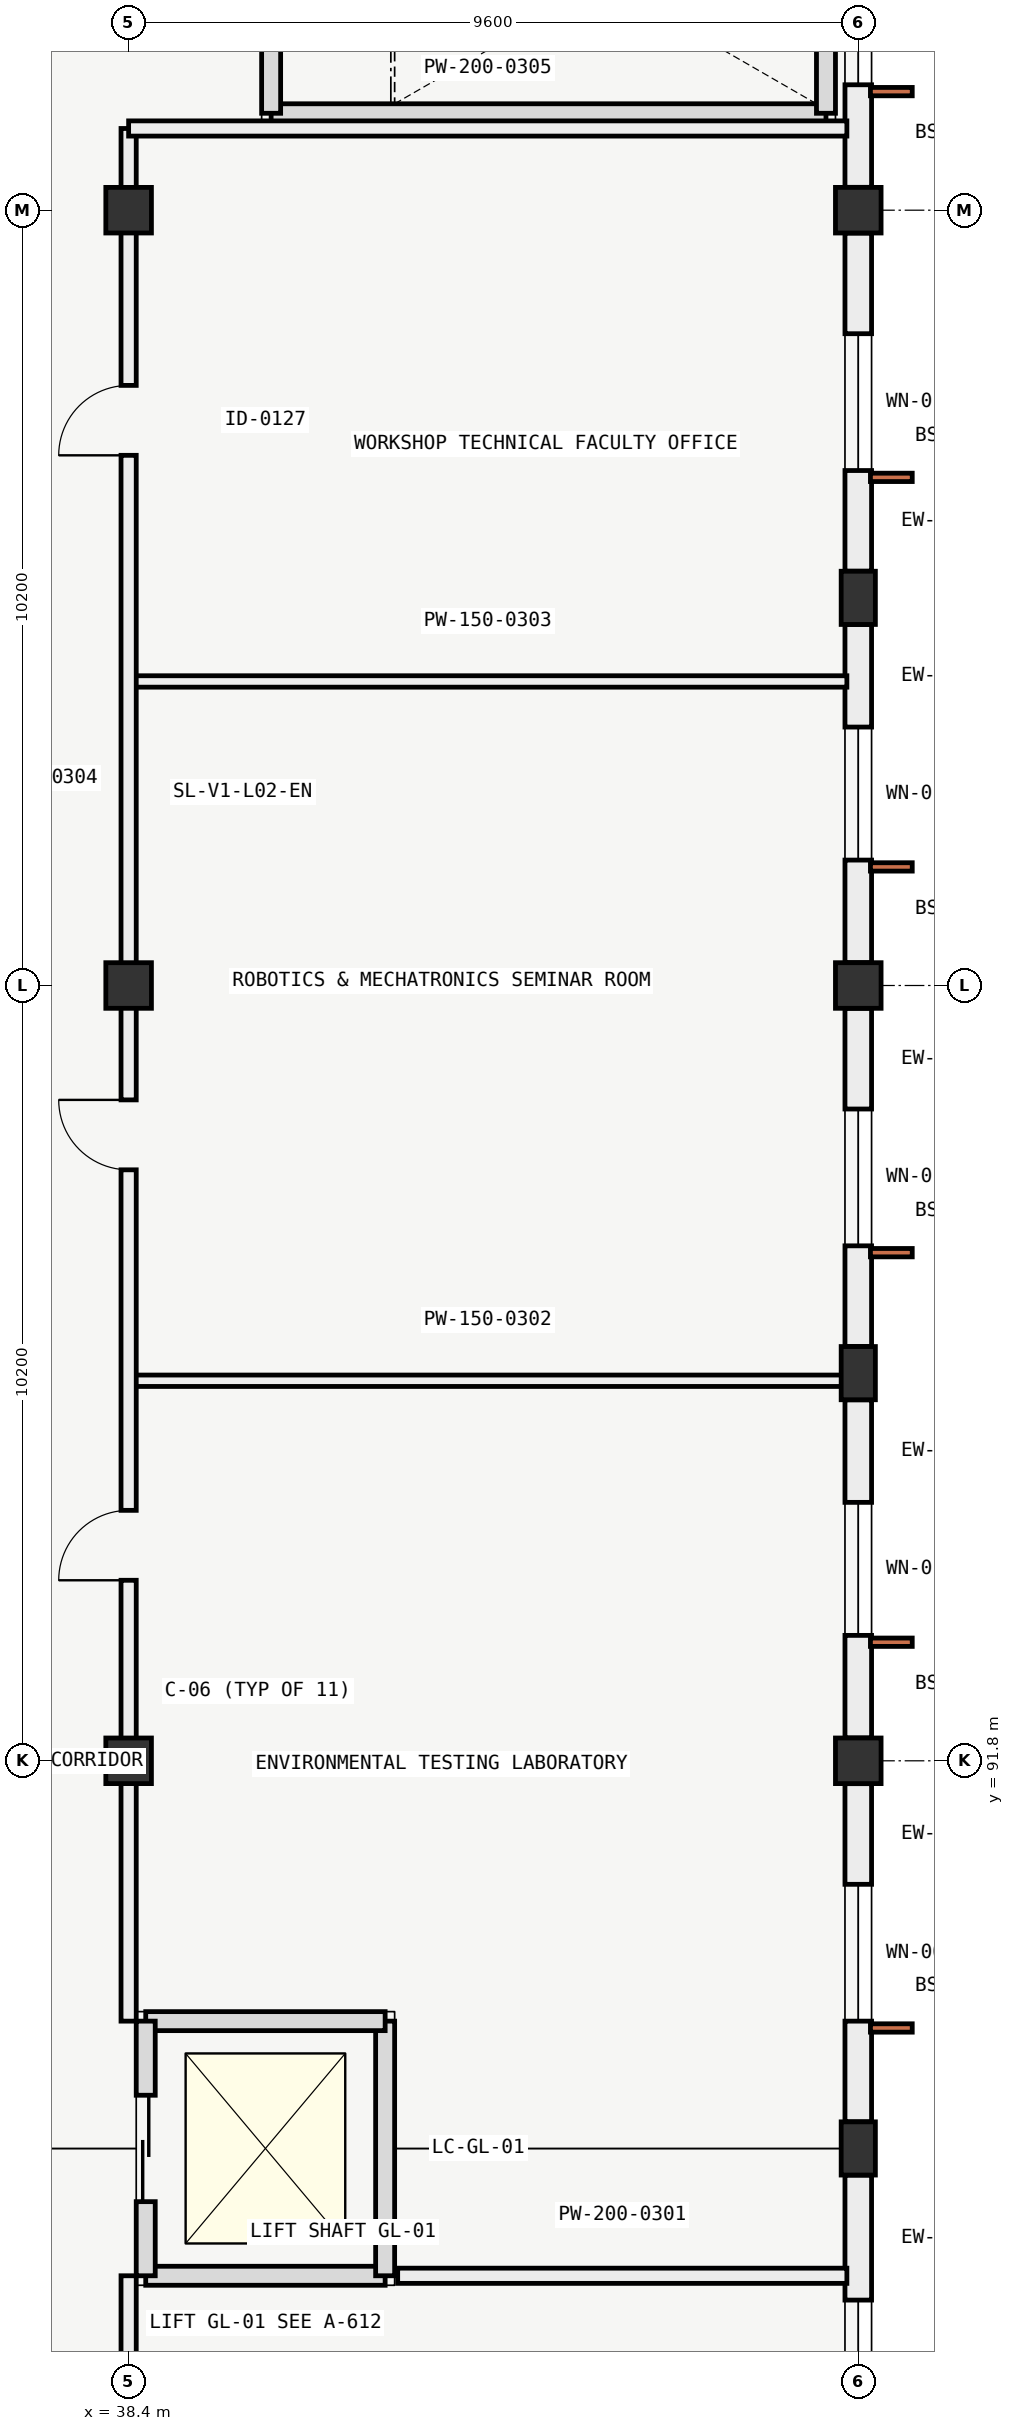
"""IFC4 building model, lengths in metres.
Left out: names, types, materials, properties, quantities, classifications, styles, units other than length and angle.
Written with IfcOpenShell. Run it as: python <this file> out.ifc"""

import sys

from ifc_helpers import new_model, si_unit, direction, frame, frame_2d, origin, origin_2d, place, context, subcontext, project, spatial, rectangle, extrude, element, fill, save


model = new_model("IFC4")
c1 = context("Model", 3, precision=1e-05, world=origin(), true_north=direction((0.0, 1.0)))
c2 = subcontext(c1, "Body", "Model", "MODEL_VIEW")
j1 = project(units=[si_unit("LENGTHUNIT", "METRE"), si_unit("PLANEANGLEUNIT", "RADIAN")], contexts=[c1])
p1 = place(None, origin())
s1 = spatial("IfcSite", under=j1, at=p1, CompositionType="ELEMENT")
p2 = place(p1, origin())
s2 = spatial("IfcBuilding", under=s1, at=p2, CompositionType="ELEMENT")
p3 = place(p2, frame((0.0, 0.0, 9.6)))
s3 = spatial("IfcBuildingStorey", under=s2, at=p3, CompositionType="ELEMENT", Elevation=9.6)
for number, where, z_axis, x_axis in (
    (1, (38.4, 91.8, 0.0), (0.0, 0.0, 1.0), (1.0, 0.0, 0.0)),
    (2, (48.0, 91.8, 0.0), (0.0, 0.0, 1.0), (1.0, 0.0, 0.0)),
    (3, (38.4, 102.0, 0.0), (0.0, 0.0, 1.0), (1.0, 0.0, 0.0)),
    (4, (48.0, 102.0, 0.0), (0.0, 0.0, 1.0), (1.0, 0.0, 0.0)),
    (5, (38.4, 112.2, 0.0), (0.0, 0.0, 1.0), (1.0, 0.0, 0.0)),
    (6, (48.0, 112.2, 0.0), (0.0, 0.0, 1.0), (1.0, 0.0, 0.0)),
):
    element("IfcColumn", number, at=place(p3, frame(where, z_axis=z_axis, x_axis=x_axis)), inside=s3, PredefinedType="COLUMN", context=c2, shape_type="SweptSolid", body=[
        extrude(rectangle(XDim=0.6, YDim=0.6, at=origin_2d()), origin(), (0.0, 0.0, 1.0), 4.2),
    ])
for number, where, z_axis, x_axis in (
    (7, (48.0, 86.7, 0.0), (0.0, 0.0, 1.0), (1.0, 0.0, 0.0)),
    (8, (48.0, 96.9, 0.0), (0.0, 0.0, 1.0), (1.0, 0.0, 0.0)),
    (9, (48.0, 107.1, 0.0), (0.0, 0.0, 1.0), (1.0, 0.0, 0.0)),
):
    element("IfcColumn", number, at=place(p3, frame(where, z_axis=z_axis, x_axis=x_axis)), inside=s3, PredefinedType="PILASTER", context=c2, shape_type="SweptSolid", body=[
        extrude(rectangle(XDim=0.45, YDim=0.7, at=origin_2d()), origin(), (0.0, 0.0, 1.0), 4.2),
    ])
p4 = place(p3, frame((48.0, 86.349, 0.0), z_axis=(0.0, 0.0, 1.0), x_axis=(0.0, -1.0, 0.0)))
e10 = element("IfcWall", 10, at=p4, inside=s3, PredefinedType="SOLIDWALL", context=c2, shape_type="SweptSolid", body=[
    extrude(rectangle(XDim=4.448, YDim=0.35, at=frame_2d((2.224, 0.0))), origin(), (0.0, 0.0, 1.0), 3.32),
])
p5 = place(p4, frame((1.644, 0.0, 0.95)))
e11 = element("IfcOpeningElement", 11, at=p5, cuts=e10, PredefinedType="OPENING", context=c2, shape_type="SweptSolid", body=[
    extrude(rectangle(XDim=1.75, YDim=2.05, at=frame_2d((0.875, 1.025))), frame((0.0, 0.185, 0.0), z_axis=(0.0, -1.0, 0.0), x_axis=(1.0, 0.0, 0.0)), (0.0, 0.0, 1.0), 0.37),
])
p6 = place(p3, frame((48.0, 91.499, 0.0), z_axis=(0.0, 0.0, 1.0), x_axis=(0.0, -1.0, 0.0)))
e12 = element("IfcWall", 12, at=p6, inside=s3, PredefinedType="SOLIDWALL", context=c2, shape_type="SweptSolid", body=[
    extrude(rectangle(XDim=4.448, YDim=0.35, at=frame_2d((2.224, 0.0))), origin(), (0.0, 0.0, 1.0), 3.32),
])
p7 = place(p6, frame((1.324, 0.0, 0.95)))
e13 = element("IfcOpeningElement", 13, at=p7, cuts=e12, PredefinedType="OPENING", context=c2, shape_type="SweptSolid", body=[
    extrude(rectangle(XDim=1.8, YDim=2.1, at=frame_2d((0.9, 1.05))), frame((0.0, 0.185, 0.0), z_axis=(0.0, -1.0, 0.0), x_axis=(1.0, 0.0, 0.0)), (0.0, 0.0, 1.0), 0.37),
])
p8 = place(p3, frame((48.0, 96.549, 0.0), z_axis=(0.0, 0.0, 1.0), x_axis=(0.0, -1.0, 0.0)))
e14 = element("IfcWall", 14, at=p8, inside=s3, PredefinedType="SOLIDWALL", context=c2, shape_type="SweptSolid", body=[
    extrude(rectangle(XDim=4.448, YDim=0.35, at=frame_2d((2.224, 0.0))), origin(), (0.0, 0.0, 1.0), 3.32),
])
p9 = place(p8, frame((1.349, 0.0, 0.95)))
e15 = element("IfcOpeningElement", 15, at=p9, cuts=e14, PredefinedType="OPENING", context=c2, shape_type="SweptSolid", body=[
    extrude(rectangle(XDim=1.75, YDim=2.05, at=frame_2d((0.875, 1.025))), frame((0.0, 0.185, 0.0), z_axis=(0.0, -1.0, 0.0), x_axis=(1.0, 0.0, 0.0)), (0.0, 0.0, 1.0), 0.37),
])
p10 = place(p3, frame((48.0, 101.699, 0.0), z_axis=(0.0, 0.0, 1.0), x_axis=(0.0, -1.0, 0.0)))
e16 = element("IfcWall", 16, at=p10, inside=s3, PredefinedType="SOLIDWALL", context=c2, shape_type="SweptSolid", body=[
    extrude(rectangle(XDim=4.448, YDim=0.35, at=frame_2d((2.224, 0.0))), origin(), (0.0, 0.0, 1.0), 3.32),
])
p11 = place(p10, frame((1.324, 0.0, 0.95)))
e17 = element("IfcOpeningElement", 17, at=p11, cuts=e16, PredefinedType="OPENING", context=c2, shape_type="SweptSolid", body=[
    extrude(rectangle(XDim=1.8, YDim=2.1, at=frame_2d((0.9, 1.05))), frame((0.0, 0.185, 0.0), z_axis=(0.0, -1.0, 0.0), x_axis=(1.0, 0.0, 0.0)), (0.0, 0.0, 1.0), 0.37),
])
p12 = place(p3, frame((48.0, 106.749, 0.0), z_axis=(0.0, 0.0, 1.0), x_axis=(0.0, -1.0, 0.0)))
e18 = element("IfcWall", 18, at=p12, inside=s3, PredefinedType="SOLIDWALL", context=c2, shape_type="SweptSolid", body=[
    extrude(rectangle(XDim=4.448, YDim=0.35, at=frame_2d((2.224, 0.0))), origin(), (0.0, 0.0, 1.0), 3.32),
])
p13 = place(p12, frame((1.349, 0.0, 0.95)))
e19 = element("IfcOpeningElement", 19, at=p13, cuts=e18, PredefinedType="OPENING", context=c2, shape_type="SweptSolid", body=[
    extrude(rectangle(XDim=1.75, YDim=2.05, at=frame_2d((0.875, 1.025))), frame((0.0, 0.185, 0.0), z_axis=(0.0, -1.0, 0.0), x_axis=(1.0, 0.0, 0.0)), (0.0, 0.0, 1.0), 0.37),
])
p14 = place(p3, frame((48.0, 111.899, 0.0), z_axis=(0.0, 0.0, 1.0), x_axis=(0.0, -1.0, 0.0)))
e20 = element("IfcWall", 20, at=p14, inside=s3, PredefinedType="SOLIDWALL", context=c2, shape_type="SweptSolid", body=[
    extrude(rectangle(XDim=4.448, YDim=0.35, at=frame_2d((2.224, 0.0))), origin(), (0.0, 0.0, 1.0), 3.32),
])
p15 = place(p14, frame((1.324, 0.0, 0.95)))
e21 = element("IfcOpeningElement", 21, at=p15, cuts=e20, PredefinedType="OPENING", context=c2, shape_type="SweptSolid", body=[
    extrude(rectangle(XDim=1.8, YDim=2.1, at=frame_2d((0.9, 1.05))), frame((0.0, 0.185, 0.0), z_axis=(0.0, -1.0, 0.0), x_axis=(1.0, 0.0, 0.0)), (0.0, 0.0, 1.0), 0.37),
])
p16 = place(p3, frame((48.0, 116.949, 0.0), z_axis=(0.0, 0.0, 1.0), x_axis=(0.0, -1.0, 0.0)))
e22 = element("IfcWall", 22, at=p16, inside=s3, PredefinedType="SOLIDWALL", context=c2, shape_type="SweptSolid", body=[
    extrude(rectangle(XDim=4.448, YDim=0.35, at=frame_2d((2.224, 0.0))), origin(), (0.0, 0.0, 1.0), 3.32),
])
p17 = place(p16, frame((1.349, 0.0, 0.95)))
e23 = element("IfcOpeningElement", 23, at=p17, cuts=e22, PredefinedType="OPENING", context=c2, shape_type="SweptSolid", body=[
    extrude(rectangle(XDim=1.75, YDim=2.05, at=frame_2d((0.875, 1.025))), frame((0.0, 0.185, 0.0), z_axis=(0.0, -1.0, 0.0), x_axis=(1.0, 0.0, 0.0)), (0.0, 0.0, 1.0), 0.37),
])
p18 = place(p3, frame((40.275, 113.475, 0.0), z_axis=(0.0, 0.0, 1.0), x_axis=(1.0, 0.0, 0.0)))
e24 = element("IfcWall", 24, at=p18, inside=s3, PredefinedType="SOLIDWALL", context=c2, shape_type="SweptSolid", body=[
    extrude(rectangle(XDim=7.3, YDim=0.25, at=frame_2d((3.65, 0.0))), origin(), (0.0, 0.0, 1.0), 3.15),
])
p19 = place(p3, frame((47.575, 113.475, 0.0), z_axis=(0.0, 0.0, 1.0), x_axis=(0.0, 1.0, 0.0)))
e25 = element("IfcWall", 25, at=p19, inside=s3, PredefinedType="SOLIDWALL", context=c2, shape_type="SweptSolid", body=[
    extrude(rectangle(XDim=3.45, YDim=0.25, at=frame_2d((1.725, 0.0))), origin(), (0.0, 0.0, 1.0), 3.15),
])
p20 = place(p3, frame((40.275, 116.925, 0.0), z_axis=(0.0, 0.0, 1.0), x_axis=(0.0, -1.0, 0.0)))
e26 = element("IfcWall", 26, at=p20, inside=s3, PredefinedType="SOLIDWALL", context=c2, shape_type="SweptSolid", body=[
    extrude(rectangle(XDim=3.45, YDim=0.25, at=frame_2d((1.725, 0.0))), origin(), (0.0, 0.0, 1.0), 3.15),
])
p21 = place(p20, frame((1.175, 0.0, 0.0)))
e27 = element("IfcOpeningElement", 27, at=p21, cuts=e26, PredefinedType="OPENING", context=c2, shape_type="SweptSolid", body=[
    extrude(rectangle(XDim=1.1, YDim=2.2, at=frame_2d((0.55, 1.1))), frame((0.0, 0.135, 0.0), z_axis=(0.0, -1.0, 0.0), x_axis=(1.0, 0.0, 0.0)), (0.0, 0.0, 1.0), 0.27),
])
p22 = place(p3, frame((38.625, 85.025, 0.0), z_axis=(0.0, 0.0, 1.0), x_axis=(1.0, 0.0, 0.0)))
e28 = element("IfcWall", 28, at=p22, inside=s3, PredefinedType="SOLIDWALL", context=c2, shape_type="SweptSolid", body=[
    extrude(rectangle(XDim=3.15, YDim=0.25, at=frame_2d((1.575, 0.0))), origin(), (0.0, 0.0, 1.0), 3.4),
])
p23 = place(p3, frame((41.775, 85.025, 0.0), z_axis=(0.0, 0.0, 1.0), x_axis=(0.0, 1.0, 0.0)))
e29 = element("IfcWall", 29, at=p23, inside=s3, PredefinedType="SOLIDWALL", context=c2, shape_type="SweptSolid", body=[
    extrude(rectangle(XDim=3.35, YDim=0.25, at=frame_2d((1.675, 0.0))), origin(), (0.0, 0.0, 1.0), 3.4),
])
p24 = place(p3, frame((41.775, 88.375, 0.0), z_axis=(0.0, 0.0, 1.0), x_axis=(-1.0, 0.0, 0.0)))
e30 = element("IfcWall", 30, at=p24, inside=s3, PredefinedType="SOLIDWALL", context=c2, shape_type="SweptSolid", body=[
    extrude(rectangle(XDim=3.15, YDim=0.25, at=frame_2d((1.575, 0.0))), origin(), (0.0, 0.0, 1.0), 3.4),
])
p25 = place(p3, frame((38.625, 88.375, 0.0), z_axis=(0.0, 0.0, 1.0), x_axis=(0.0, -1.0, 0.0)))
e31 = element("IfcWall", 31, at=p25, inside=s3, PredefinedType="SOLIDWALL", context=c2, shape_type="SweptSolid", body=[
    extrude(rectangle(XDim=3.35, YDim=0.25, at=frame_2d((1.675, 0.0))), origin(), (0.0, 0.0, 1.0), 3.4),
])
p26 = place(p25, frame((0.975, 0.0, 0.0)))
e32 = element("IfcOpeningElement", 32, at=p26, cuts=e31, PredefinedType="OPENING", context=c2, shape_type="SweptSolid", body=[
    extrude(rectangle(XDim=1.4, YDim=2.2, at=frame_2d((0.7, 1.1))), frame((0.0, 0.135, 0.0), z_axis=(0.0, -1.0, 0.0), x_axis=(1.0, 0.0, 0.0)), (0.0, 0.0, 1.0), 0.27),
])
p27 = place(p3, frame((38.4, 58.325, 0.0), z_axis=(0.0, 0.0, 1.0), x_axis=(0.0, 1.0, 0.0)))
e33 = element("IfcWall", 33, at=p27, inside=s3, PredefinedType="PARTITIONING", context=c2, shape_type="SweptSolid", body=[
    extrude(rectangle(XDim=26.7, YDim=0.2, at=frame_2d((13.35, 0.0))), origin(), (0.0, 0.0, 1.0), 3.56),
])
p28 = place(p27, frame((1.35, 0.0, 0.0)))
e34 = element("IfcOpeningElement", 34, at=p28, cuts=e33, PredefinedType="OPENING", context=c2, shape_type="SweptSolid", body=[
    extrude(rectangle(XDim=0.92, YDim=2.1, at=frame_2d((0.46, 1.05))), frame((0.0, 0.11, 0.0), z_axis=(0.0, -1.0, 0.0), x_axis=(1.0, 0.0, 0.0)), (0.0, 0.0, 1.0), 0.22),
])
p29 = place(p27, frame((6.08, 0.0, 0.0)))
e35 = element("IfcOpeningElement", 35, at=p29, cuts=e33, PredefinedType="OPENING", context=c2, shape_type="SweptSolid", body=[
    extrude(rectangle(XDim=0.9, YDim=2.05, at=frame_2d((0.45, 1.025))), frame((0.0, 0.11, 0.0), z_axis=(0.0, -1.0, 0.0), x_axis=(1.0, 0.0, 0.0)), (0.0, 0.0, 1.0), 0.22),
])
p30 = place(p27, frame((10.6, 0.0, 0.0)))
e36 = element("IfcOpeningElement", 36, at=p30, cuts=e33, PredefinedType="OPENING", context=c2, shape_type="SweptSolid", body=[
    extrude(rectangle(XDim=0.92, YDim=2.1, at=frame_2d((0.46, 1.05))), frame((0.0, 0.11, 0.0), z_axis=(0.0, -1.0, 0.0), x_axis=(1.0, 0.0, 0.0)), (0.0, 0.0, 1.0), 0.22),
])
p31 = place(p27, frame((20.3, 0.0, 0.0)))
e37 = element("IfcOpeningElement", 37, at=p31, cuts=e33, PredefinedType="OPENING", context=c2, shape_type="SweptSolid", body=[
    extrude(rectangle(XDim=0.92, YDim=2.1, at=frame_2d((0.46, 1.05))), frame((0.0, 0.11, 0.0), z_axis=(0.0, -1.0, 0.0), x_axis=(1.0, 0.0, 0.0)), (0.0, 0.0, 1.0), 0.22),
])
p32 = place(p3, frame((41.94, 85.025, 0.0), z_axis=(0.0, 0.0, 1.0), x_axis=(1.0, 0.0, 0.0)))
e38 = element("IfcWall", 38, at=p32, inside=s3, PredefinedType="PARTITIONING", context=c2, shape_type="SweptSolid", body=[
    extrude(rectangle(XDim=5.91, YDim=0.2, at=frame_2d((2.955, 0.0))), origin(), (0.0, 0.0, 1.0), 3.85),
])
for number, where, z_axis, x_axis in (
    (39, (38.4, 96.8, 0.0), (0.0, 0.0, 1.0), (1.0, 0.0, 0.0)),
    (40, (38.4, 106.0, 0.0), (0.0, 0.0, 1.0), (1.0, 0.0, 0.0)),
):
    element("IfcWall", number, at=place(p3, frame(where, z_axis=z_axis, x_axis=x_axis)), inside=s3, PredefinedType="PARTITIONING", context=c2, shape_type="SweptSolid", body=[
        extrude(rectangle(XDim=9.45, YDim=0.15, at=frame_2d((4.725, 0.0))), origin(), (0.0, 0.0, 1.0), 3.85),
    ])
p33 = place(p3, frame((38.4, 88.375, 0.0), z_axis=(0.0, 0.0, 1.0), x_axis=(0.0, 1.0, 0.0)))
e41 = element("IfcWall", 41, at=p33, inside=s3, PredefinedType="PARTITIONING", context=c2, shape_type="SweptSolid", body=[
    extrude(rectangle(XDim=24.9, YDim=0.2, at=frame_2d((12.45, 0.0))), origin(), (0.0, 0.0, 1.0), 3.56),
])
p34 = place(p33, frame((5.8, 0.0, 0.0)))
e42 = element("IfcOpeningElement", 42, at=p34, cuts=e41, PredefinedType="OPENING", context=c2, shape_type="SweptSolid", body=[
    extrude(rectangle(XDim=0.92, YDim=2.1, at=frame_2d((0.46, 1.05))), frame((0.0, 0.11, 0.0), z_axis=(0.0, -1.0, 0.0), x_axis=(1.0, 0.0, 0.0)), (0.0, 0.0, 1.0), 0.22),
])
p35 = place(p33, frame((11.2, 0.0, 0.0)))
e43 = element("IfcOpeningElement", 43, at=p35, cuts=e41, PredefinedType="OPENING", context=c2, shape_type="SweptSolid", body=[
    extrude(rectangle(XDim=0.92, YDim=2.1, at=frame_2d((0.46, 1.05))), frame((0.0, 0.11, 0.0), z_axis=(0.0, -1.0, 0.0), x_axis=(1.0, 0.0, 0.0)), (0.0, 0.0, 1.0), 0.22),
])
p36 = place(p33, frame((20.6, 0.0, 0.0)))
e44 = element("IfcOpeningElement", 44, at=p36, cuts=e41, PredefinedType="OPENING", context=c2, shape_type="SweptSolid", body=[
    extrude(rectangle(XDim=0.92, YDim=2.1, at=frame_2d((0.46, 1.05))), frame((0.0, 0.11, 0.0), z_axis=(0.0, -1.0, 0.0), x_axis=(1.0, 0.0, 0.0)), (0.0, 0.0, 1.0), 0.22),
])
p37 = place(p3, frame((38.4, 113.275, 0.0), z_axis=(0.0, 0.0, 1.0), x_axis=(1.0, 0.0, 0.0)))
e45 = element("IfcWall", 45, at=p37, inside=s3, PredefinedType="PARTITIONING", context=c2, shape_type="SweptSolid", body=[
    extrude(rectangle(XDim=9.45, YDim=0.2, at=frame_2d((4.725, 0.0))), origin(), (0.0, 0.0, 1.0), 3.85),
])
p38 = place(p5, origin())
e46 = element("IfcWindow", 46, at=p38, inside=s3, PartitioningType="SINGLE_PANEL", PredefinedType="WINDOW", context=c2, shape_type="SweptSolid", body=[
    extrude(rectangle(XDim=1.75, YDim=2.05, at=frame_2d((0.875, 1.025))), frame((0.0, 0.03, 0.0), z_axis=(0.0, -1.0, 0.0), x_axis=(1.0, 0.0, 0.0)), (0.0, 0.0, 1.0), 0.06),
])
fill(e11, e46)
p39 = place(p7, origin())
e47 = element("IfcWindow", 47, at=p39, inside=s3, PartitioningType="SINGLE_PANEL", PredefinedType="WINDOW", context=c2, shape_type="SweptSolid", body=[
    extrude(rectangle(XDim=1.8, YDim=2.1, at=frame_2d((0.9, 1.05))), frame((0.0, 0.03, 0.0), z_axis=(0.0, -1.0, 0.0), x_axis=(1.0, 0.0, 0.0)), (0.0, 0.0, 1.0), 0.06),
])
fill(e13, e47)
p40 = place(p9, origin())
e48 = element("IfcWindow", 48, at=p40, inside=s3, PartitioningType="SINGLE_PANEL", PredefinedType="WINDOW", context=c2, shape_type="SweptSolid", body=[
    extrude(rectangle(XDim=1.75, YDim=2.05, at=frame_2d((0.875, 1.025))), frame((0.0, 0.03, 0.0), z_axis=(0.0, -1.0, 0.0), x_axis=(1.0, 0.0, 0.0)), (0.0, 0.0, 1.0), 0.06),
])
fill(e15, e48)
p41 = place(p11, origin())
e49 = element("IfcWindow", 49, at=p41, inside=s3, PartitioningType="SINGLE_PANEL", PredefinedType="WINDOW", context=c2, shape_type="SweptSolid", body=[
    extrude(rectangle(XDim=1.8, YDim=2.1, at=frame_2d((0.9, 1.05))), frame((0.0, 0.03, 0.0), z_axis=(0.0, -1.0, 0.0), x_axis=(1.0, 0.0, 0.0)), (0.0, 0.0, 1.0), 0.06),
])
fill(e17, e49)
p42 = place(p13, origin())
e50 = element("IfcWindow", 50, at=p42, inside=s3, PartitioningType="SINGLE_PANEL", PredefinedType="WINDOW", context=c2, shape_type="SweptSolid", body=[
    extrude(rectangle(XDim=1.75, YDim=2.05, at=frame_2d((0.875, 1.025))), frame((0.0, 0.03, 0.0), z_axis=(0.0, -1.0, 0.0), x_axis=(1.0, 0.0, 0.0)), (0.0, 0.0, 1.0), 0.06),
])
fill(e19, e50)
p43 = place(p15, origin())
e51 = element("IfcWindow", 51, at=p43, inside=s3, PartitioningType="SINGLE_PANEL", PredefinedType="WINDOW", context=c2, shape_type="SweptSolid", body=[
    extrude(rectangle(XDim=1.8, YDim=2.1, at=frame_2d((0.9, 1.05))), frame((0.0, 0.03, 0.0), z_axis=(0.0, -1.0, 0.0), x_axis=(1.0, 0.0, 0.0)), (0.0, 0.0, 1.0), 0.06),
])
fill(e21, e51)
p44 = place(p17, origin())
e52 = element("IfcWindow", 52, at=p44, inside=s3, PartitioningType="SINGLE_PANEL", PredefinedType="WINDOW", context=c2, shape_type="SweptSolid", body=[
    extrude(rectangle(XDim=1.75, YDim=2.05, at=frame_2d((0.875, 1.025))), frame((0.0, 0.03, 0.0), z_axis=(0.0, -1.0, 0.0), x_axis=(1.0, 0.0, 0.0)), (0.0, 0.0, 1.0), 0.06),
])
fill(e23, e52)
p45 = place(p26, origin())
e53 = element("IfcDoor", 53, at=p45, inside=s3, OperationType="DOUBLE_DOOR_SLIDING", PredefinedType="DOOR", context=c2, shape_type="SweptSolid", body=[
    extrude(rectangle(XDim=1.4, YDim=2.2, at=frame_2d((0.7, 1.1))), frame((0.0, 0.025, 0.0), z_axis=(0.0, -1.0, 0.0), x_axis=(1.0, 0.0, 0.0)), (0.0, 0.0, 1.0), 0.05),
])
fill(e32, e53)
p46 = place(p34, origin())
e54 = element("IfcDoor", 54, at=p46, inside=s3, OperationType="SINGLE_SWING_LEFT", PredefinedType="DOOR", context=c2, shape_type="SweptSolid", body=[
    extrude(rectangle(XDim=0.92, YDim=2.1, at=frame_2d((0.46, 1.05))), frame((0.0, 0.025, 0.0), z_axis=(0.0, -1.0, 0.0), x_axis=(1.0, 0.0, 0.0)), (0.0, 0.0, 1.0), 0.05),
])
fill(e42, e54)
p47 = place(p35, origin())
e55 = element("IfcDoor", 55, at=p47, inside=s3, OperationType="SINGLE_SWING_RIGHT", PredefinedType="DOOR", context=c2, shape_type="SweptSolid", body=[
    extrude(rectangle(XDim=0.92, YDim=2.1, at=frame_2d((0.46, 1.05))), frame((0.0, 0.025, 0.0), z_axis=(0.0, -1.0, 0.0), x_axis=(1.0, 0.0, 0.0)), (0.0, 0.0, 1.0), 0.05),
])
fill(e43, e55)
p48 = place(p36, origin())
e56 = element("IfcDoor", 56, at=p48, inside=s3, OperationType="SINGLE_SWING_LEFT", PredefinedType="DOOR", context=c2, shape_type="SweptSolid", body=[
    extrude(rectangle(XDim=0.92, YDim=2.1, at=frame_2d((0.46, 1.05))), frame((0.0, 0.025, 0.0), z_axis=(0.0, -1.0, 0.0), x_axis=(1.0, 0.0, 0.0)), (0.0, 0.0, 1.0), 0.05),
])
fill(e44, e56)
save(model, sys.argv[1])
